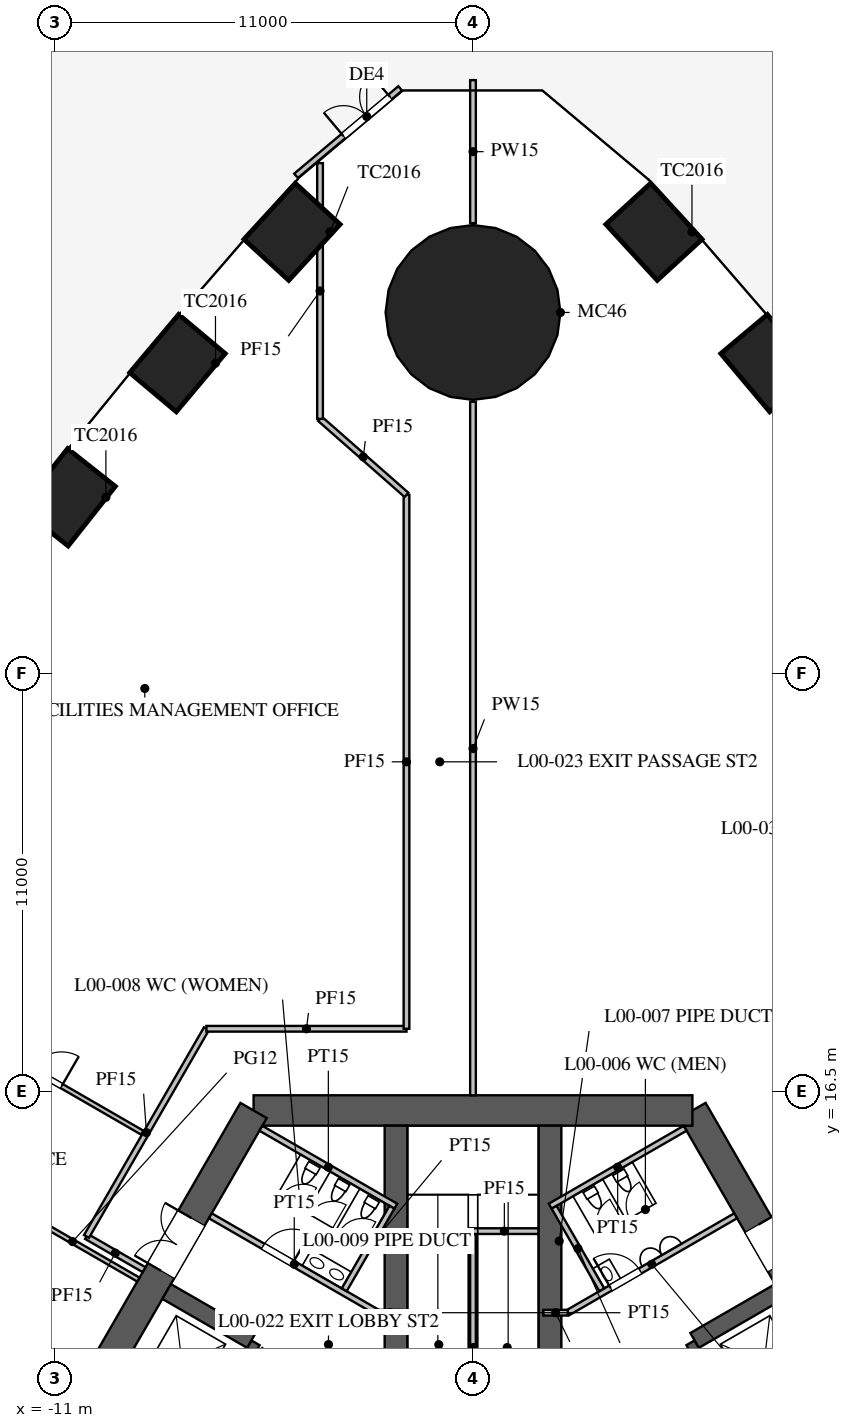
"""IFC4 building model, lengths in metres.
Left out: names, types, materials, properties, quantities, classifications, styles, units other than length and angle.
Written with IfcOpenShell. Run it as: python <this file> out.ifc"""

import sys

from ifc_helpers import new_model, si_unit, direction, frame, frame_2d, origin, origin_2d, place, context, subcontext, project, spatial, polyline, rectangle, circle, outline, extrude, element, fill, save


model = new_model("IFC4")
c1 = context("Model", 3, precision=1e-05, world=origin(), true_north=direction((0.0, 1.0)))
c2 = subcontext(c1, "Body", "Model", "MODEL_VIEW")
j1 = project(units=[si_unit("LENGTHUNIT", "METRE"), si_unit("PLANEANGLEUNIT", "RADIAN")], contexts=[c1])
p1 = place(None, origin())
s1 = spatial("IfcSite", under=j1, at=p1, CompositionType="ELEMENT")
p2 = place(p1, origin())
s2 = spatial("IfcBuilding", under=s1, at=p2, CompositionType="ELEMENT")
p3 = place(p2, origin())
s3 = spatial("IfcBuildingStorey", under=s2, at=p3, CompositionType="ELEMENT", Elevation=0.0)
for number, where, z_axis, x_axis in (
    (1, (7.776, 35.667, 0.0), (0.0, 0.0, 1.0), (-0.643, 0.766, 0.0)),
    (2, (4.762, 39.122, 0.0), (0.0, 0.0, 1.0), (-0.676, 0.737, 0.0)),
    (3, (-4.762, 39.122, 0.0), (0.0, 0.0, 1.0), (-0.676, -0.737, 0.0)),
    (4, (-7.776, 35.667, 0.0), (0.0, 0.0, 1.0), (-0.643, -0.766, 0.0)),
    (5, (-10.66, 32.135, 0.0), (0.0, 0.0, 1.0), (-0.62, -0.784, 0.0)),
):
    element("IfcColumn", number, at=place(p3, frame(where, z_axis=z_axis, x_axis=x_axis)), inside=s3, PredefinedType="COLUMN", context=c2, shape_type="SweptSolid", body=[
        extrude(rectangle(XDim=2.0, YDim=1.6, at=origin_2d()), origin(), (0.0, 0.0, 1.0), 6.5),
    ])
p4 = place(p3, frame((0.0, 37.0, 0.0), z_axis=(0.0, 0.0, 1.0), x_axis=(1.0, 0.0, 0.0)))
e6 = element("IfcColumn", 6, at=p4, inside=s3, PredefinedType="COLUMN", context=c2, shape_type="SweptSolid", body=[
    extrude(circle(Radius=2.3, at=origin_2d()), origin(), (0.0, 0.0, 1.0), 6.5),
])
p5 = place(p3, frame((16.743, -3.0, 0.0), z_axis=(0.0, 0.0, 1.0), x_axis=(-0.500002442456, 0.866023993627, 0.0)))
e7 = element("IfcWall", 7, at=p5, inside=s3, PredefinedType="SHEAR", context=c2, shape_type="SweptSolid", body=[
    extrude(rectangle(XDim=21.939, YDim=0.8, at=frame_2d((10.97, 0.0))), origin(), (0.0, 0.0, 1.0), 6.5),
])
p6 = place(p5, frame((17.27, 0.0, 0.0)))
e8 = element("IfcOpeningElement", 8, at=p6, cuts=e7, PredefinedType="OPENING", context=c2, shape_type="SweptSolid", body=[
    extrude(rectangle(XDim=1.2, YDim=2.1, at=frame_2d((0.6, 1.05))), frame((0.0, 0.41, 0.0), z_axis=(0.0, -1.0, 0.0), x_axis=(1.0, 0.0, 0.0)), (0.0, 0.0, 1.0), 0.82),
])
p7 = place(p5, frame((3.27, 0.0, 0.0)))
e9 = element("IfcOpeningElement", 9, at=p7, cuts=e7, PredefinedType="OPENING", context=c2, shape_type="SweptSolid", body=[
    extrude(rectangle(XDim=1.6, YDim=2.1, at=frame_2d((0.8, 1.05))), frame((0.0, 0.41, 0.0), z_axis=(0.0, -1.0, 0.0), x_axis=(1.0, 0.0, 0.0)), (0.0, 0.0, 1.0), 0.82),
])
p8 = place(p3, frame((5.773, 16.0, 0.0), z_axis=(0.0, 0.0, 1.0), x_axis=(-1.0, 0.0, 0.0)))
e10 = element("IfcWall", 10, at=p8, inside=s3, PredefinedType="SHEAR", context=c2, shape_type="SweptSolid", body=[
    extrude(rectangle(XDim=11.547, YDim=0.8, at=frame_2d((5.773, 0.0))), origin(), (0.0, 0.0, 1.0), 6.5),
])
p9 = place(p3, frame((-5.773, 16.0, 0.0), z_axis=(0.0, 0.0, 1.0), x_axis=(-0.500002442456, -0.866023993627, 0.0)))
e11 = element("IfcWall", 11, at=p9, inside=s3, PredefinedType="SHEAR", context=c2, shape_type="SweptSolid", body=[
    extrude(rectangle(XDim=21.939, YDim=0.8, at=frame_2d((10.97, 0.0))), origin(), (0.0, 0.0, 1.0), 6.5),
])
p10 = place(p9, frame((17.27, 0.0, 0.0)))
e12 = element("IfcOpeningElement", 12, at=p10, cuts=e11, PredefinedType="OPENING", context=c2, shape_type="SweptSolid", body=[
    extrude(rectangle(XDim=1.2, YDim=2.1, at=frame_2d((0.6, 1.05))), frame((0.0, 0.41, 0.0), z_axis=(0.0, -1.0, 0.0), x_axis=(1.0, 0.0, 0.0)), (0.0, 0.0, 1.0), 0.82),
])
p11 = place(p9, frame((3.27, 0.0, 0.0)))
e13 = element("IfcOpeningElement", 13, at=p11, cuts=e11, PredefinedType="OPENING", context=c2, shape_type="SweptSolid", body=[
    extrude(rectangle(XDim=1.6, YDim=2.1, at=frame_2d((0.8, 1.05))), frame((0.0, 0.41, 0.0), z_axis=(0.0, -1.0, 0.0), x_axis=(1.0, 0.0, 0.0)), (0.0, 0.0, 1.0), 0.82),
])
p12 = place(p3, frame((11.424, 0.014, 0.0), z_axis=(0.0, 0.0, 1.0), x_axis=(-0.500001763848, 0.866024385424, 0.0)))
e14 = element("IfcWall", 14, at=p12, inside=s3, PredefinedType="SHEAR", context=c2, shape_type="SweptSolid", body=[
    extrude(rectangle(XDim=11.4, YDim=0.25, at=frame_2d((5.7, 0.0))), origin(), (0.0, 0.0, 1.0), 6.5),
])
p13 = place(p12, frame((0.875, 0.0, 0.0)))
e15 = element("IfcOpeningElement", 15, at=p13, cuts=e14, PredefinedType="OPENING", context=c2, shape_type="SweptSolid", body=[
    extrude(rectangle(XDim=1.1, YDim=2.2, at=frame_2d((0.55, 1.1))), frame((0.0, 0.135, 0.0), z_axis=(0.0, -1.0, 0.0), x_axis=(1.0, 0.0, 0.0)), (0.0, 0.0, 1.0), 0.27),
])
p14 = place(p12, frame((3.725, 0.0, 0.0)))
e16 = element("IfcOpeningElement", 16, at=p14, cuts=e14, PredefinedType="OPENING", context=c2, shape_type="SweptSolid", body=[
    extrude(rectangle(XDim=1.1, YDim=2.2, at=frame_2d((0.55, 1.1))), frame((0.0, 0.135, 0.0), z_axis=(0.0, -1.0, 0.0), x_axis=(1.0, 0.0, 0.0)), (0.0, 0.0, 1.0), 0.27),
])
p15 = place(p12, frame((6.575, 0.0, 0.0)))
e17 = element("IfcOpeningElement", 17, at=p15, cuts=e14, PredefinedType="OPENING", context=c2, shape_type="SweptSolid", body=[
    extrude(rectangle(XDim=1.1, YDim=2.2, at=frame_2d((0.55, 1.1))), frame((0.0, 0.135, 0.0), z_axis=(0.0, -1.0, 0.0), x_axis=(1.0, 0.0, 0.0)), (0.0, 0.0, 1.0), 0.27),
])
p16 = place(p12, frame((9.425, 0.0, 0.0)))
e18 = element("IfcOpeningElement", 18, at=p16, cuts=e14, PredefinedType="OPENING", context=c2, shape_type="SweptSolid", body=[
    extrude(rectangle(XDim=1.1, YDim=2.2, at=frame_2d((0.55, 1.1))), frame((0.0, 0.135, 0.0), z_axis=(0.0, -1.0, 0.0), x_axis=(1.0, 0.0, 0.0)), (0.0, 0.0, 1.0), 0.27),
])
p17 = place(p3, frame((5.832, 9.949, 0.0), z_axis=(0.0, 0.0, 1.0), x_axis=(0.866029291668, 0.499993265928, 0.0)))
e19 = element("IfcWall", 19, at=p17, inside=s3, PredefinedType="SHEAR", context=c2, shape_type="SweptSolid", body=[
    extrude(rectangle(XDim=2.575, YDim=0.45, at=frame_2d((1.288, 0.0))), origin(), (0.0, 0.0, 1.0), 6.5),
])
p18 = place(p3, frame((-5.724, 9.886, 0.0), z_axis=(0.0, 0.0, 1.0), x_axis=(-0.500001763848, -0.866024385424, 0.0)))
e20 = element("IfcWall", 20, at=p18, inside=s3, PredefinedType="SHEAR", context=c2, shape_type="SweptSolid", body=[
    extrude(rectangle(XDim=11.4, YDim=0.25, at=frame_2d((5.7, 0.0))), origin(), (0.0, 0.0, 1.0), 6.5),
])
p19 = place(p18, frame((0.875, 0.0, 0.0)))
e21 = element("IfcOpeningElement", 21, at=p19, cuts=e20, PredefinedType="OPENING", context=c2, shape_type="SweptSolid", body=[
    extrude(rectangle(XDim=1.1, YDim=2.2, at=frame_2d((0.55, 1.1))), frame((0.0, 0.135, 0.0), z_axis=(0.0, -1.0, 0.0), x_axis=(1.0, 0.0, 0.0)), (0.0, 0.0, 1.0), 0.27),
])
p20 = place(p18, frame((3.725, 0.0, 0.0)))
e22 = element("IfcOpeningElement", 22, at=p20, cuts=e20, PredefinedType="OPENING", context=c2, shape_type="SweptSolid", body=[
    extrude(rectangle(XDim=1.1, YDim=2.2, at=frame_2d((0.55, 1.1))), frame((0.0, 0.135, 0.0), z_axis=(0.0, -1.0, 0.0), x_axis=(1.0, 0.0, 0.0)), (0.0, 0.0, 1.0), 0.27),
])
p21 = place(p18, frame((6.525, 0.0, 0.0)))
e23 = element("IfcOpeningElement", 23, at=p21, cuts=e20, PredefinedType="OPENING", context=c2, shape_type="SweptSolid", body=[
    extrude(rectangle(XDim=1.2, YDim=2.2, at=frame_2d((0.6, 1.1))), frame((0.0, 0.135, 0.0), z_axis=(0.0, -1.0, 0.0), x_axis=(1.0, 0.0, 0.0)), (0.0, 0.0, 1.0), 0.27),
])
p22 = place(p18, frame((9.375, 0.0, 0.0)))
e24 = element("IfcOpeningElement", 24, at=p22, cuts=e20, PredefinedType="OPENING", context=c2, shape_type="SweptSolid", body=[
    extrude(rectangle(XDim=1.2, YDim=2.2, at=frame_2d((0.6, 1.1))), frame((0.0, 0.135, 0.0), z_axis=(0.0, -1.0, 0.0), x_axis=(1.0, 0.0, 0.0)), (0.0, 0.0, 1.0), 0.27),
])
p23 = place(p3, frame((-5.832, 9.949, 0.0), z_axis=(0.0, 0.0, 1.0), x_axis=(-0.866029291668, 0.499993265928, 0.0)))
e25 = element("IfcWall", 25, at=p23, inside=s3, PredefinedType="SHEAR", context=c2, shape_type="SweptSolid", body=[
    extrude(rectangle(XDim=2.575, YDim=0.45, at=frame_2d((1.288, 0.0))), origin(), (0.0, 0.0, 1.0), 6.5),
])
p24 = place(p3, frame((2.025, 6.525, 0.0), z_axis=(0.0, 0.0, 1.0), x_axis=(0.0, 1.0, 0.0)))
e26 = element("IfcWall", 26, at=p24, inside=s3, PredefinedType="SHEAR", context=c2, shape_type="SweptSolid", body=[
    extrude(rectangle(XDim=9.075, YDim=0.6, at=frame_2d((4.538, 0.0))), origin(), (0.0, 0.0, 1.0), 6.5),
])
p25 = place(p3, frame((-2.025, 6.525, 0.0), z_axis=(0.0, 0.0, 1.0), x_axis=(0.0, 1.0, 0.0)))
e27 = element("IfcWall", 27, at=p25, inside=s3, PredefinedType="SHEAR", context=c2, shape_type="SweptSolid", body=[
    extrude(rectangle(XDim=9.075, YDim=0.6, at=frame_2d((4.538, 0.0))), origin(), (0.0, 0.0, 1.0), 6.5),
])
p26 = place(p25, frame((0.265, 0.0, 0.0)))
e28 = element("IfcOpeningElement", 28, at=p26, cuts=e27, PredefinedType="OPENING", context=c2, shape_type="SweptSolid", body=[
    extrude(rectangle(XDim=1.6, YDim=2.1, at=frame_2d((0.8, 1.05))), frame((0.0, 0.31, 0.0), z_axis=(0.0, -1.0, 0.0), x_axis=(1.0, 0.0, 0.0)), (0.0, 0.0, 1.0), 0.62),
])
p27 = place(p3, frame((-1.915, 42.896, 0.0), z_axis=(0.0, 0.0, 1.0), x_axis=(-0.766030048501, -0.642804764134, 0.0)))
e29 = element("IfcWall", 29, at=p27, inside=s3, PredefinedType="SOLIDWALL", context=c2, shape_type="SweptSolid", body=[
    extrude(rectangle(XDim=3.578, YDim=0.15, at=frame_2d((1.789, 0.0))), origin(), (0.0, 0.0, 1.0), 6.48),
])
p28 = place(p27, frame((0.35, 0.0, 0.0)))
e30 = element("IfcOpeningElement", 30, at=p28, cuts=e29, PredefinedType="OPENING", context=c2, shape_type="SweptSolid", body=[
    extrude(rectangle(XDim=1.6, YDim=2.4, at=frame_2d((0.8, 1.2))), frame((0.0, 0.085, 0.0), z_axis=(0.0, -1.0, 0.0), x_axis=(1.0, 0.0, 0.0)), (0.0, 0.0, 1.0), 0.17),
])
p29 = place(p3, frame((2.495, 10.678, 0.0), z_axis=(0.0, 0.0, 1.0), x_axis=(0.86602216432, 0.500005610874, 0.0)))
e31 = element("IfcWall", 31, at=p29, inside=s3, PredefinedType="PARTITIONING", context=c2, shape_type="SweptSolid", body=[
    extrude(rectangle(XDim=5.1, YDim=0.15, at=frame_2d((2.55, 0.0))), origin(), (0.0, 0.0, 1.0), 6.3),
])
p30 = place(p29, frame((1.3, 0.0, 0.0)))
e32 = element("IfcOpeningElement", 32, at=p30, cuts=e31, PredefinedType="OPENING", context=c2, shape_type="SweptSolid", body=[
    extrude(rectangle(XDim=0.9, YDim=2.1, at=frame_2d((0.45, 1.05))), frame((0.0, 0.085, 0.0), z_axis=(0.0, -1.0, 0.0), x_axis=(1.0, 0.0, 0.0)), (0.0, 0.0, 1.0), 0.17),
])
p31 = place(p3, frame((-2.495, 10.678, 0.0), z_axis=(0.0, 0.0, 1.0), x_axis=(-0.86602216432, 0.500005610874, 0.0)))
e33 = element("IfcWall", 33, at=p31, inside=s3, PredefinedType="PARTITIONING", context=c2, shape_type="SweptSolid", body=[
    extrude(rectangle(XDim=5.1, YDim=0.15, at=frame_2d((2.55, 0.0))), origin(), (0.0, 0.0, 1.0), 6.3),
])
p32 = place(p31, frame((2.6, 0.0, 0.0)))
e34 = element("IfcOpeningElement", 34, at=p32, cuts=e33, PredefinedType="OPENING", context=c2, shape_type="SweptSolid", body=[
    extrude(rectangle(XDim=0.9, YDim=2.1, at=frame_2d((0.45, 1.05))), frame((0.0, 0.085, 0.0), z_axis=(0.0, -1.0, 0.0), x_axis=(1.0, 0.0, 0.0)), (0.0, 0.0, 1.0), 0.17),
])
for number, where, z_axis, x_axis in (
    (35, (2.495, 10.678, 0.0), (0.0, 0.0, 1.0), (-1.0, 0.0, 0.0)),
    (36, (-2.495, 10.678, 0.0), (0.0, 0.0, 1.0), (1.0, 0.0, 0.0)),
):
    element("IfcWall", number, at=place(p3, frame(where, z_axis=z_axis, x_axis=x_axis)), inside=s3, PredefinedType="PARTITIONING", context=c2, shape_type="SweptSolid", body=[
        extrude(rectangle(XDim=0.645, YDim=0.15, at=frame_2d((0.323, 0.0))), origin(), (0.0, 0.0, 1.0), 6.3),
    ])
p33 = place(p3, frame((2.031, 13.482, 0.0), z_axis=(0.0, 0.0, 1.0), x_axis=(0.866050731258, 0.499956128963, 0.0)))
e37 = element("IfcWall", 37, at=p33, inside=s3, PredefinedType="PARTITIONING", context=c2, shape_type="SweptSolid", body=[
    extrude(rectangle(XDim=4.1, YDim=0.15, at=frame_2d((2.05, 0.0))), origin(), (0.0, 0.0, 1.0), 6.3),
])
p34 = place(p3, frame((3.389, 11.281, 0.0), z_axis=(0.0, 0.0, 1.0), x_axis=(-0.499989096993, 0.866031698547, 0.0)))
e38 = element("IfcWall", 38, at=p34, inside=s3, PredefinedType="PARTITIONING", context=c2, shape_type="SweptSolid", body=[
    extrude(rectangle(XDim=2.51, YDim=0.15, at=frame_2d((1.255, 0.0))), origin(), (0.0, 0.0, 1.0), 6.3),
])
p35 = place(p3, frame((-2.031, 13.482, 0.0), z_axis=(0.0, 0.0, 1.0), x_axis=(-0.866050731258, 0.499956128963, 0.0)))
e39 = element("IfcWall", 39, at=p35, inside=s3, PredefinedType="PARTITIONING", context=c2, shape_type="SweptSolid", body=[
    extrude(rectangle(XDim=4.1, YDim=0.15, at=frame_2d((2.05, 0.0))), origin(), (0.0, 0.0, 1.0), 6.3),
])
p36 = place(p3, frame((-3.389, 11.281, 0.0), z_axis=(0.0, 0.0, 1.0), x_axis=(0.499989096993, 0.866031698547, 0.0)))
e40 = element("IfcWall", 40, at=p36, inside=s3, PredefinedType="PARTITIONING", context=c2, shape_type="SweptSolid", body=[
    extrude(rectangle(XDim=2.51, YDim=0.15, at=frame_2d((1.255, 0.0))), origin(), (0.0, 0.0, 1.0), 6.3),
])
p37 = place(p3, frame((0.0, 16.4, 0.0), z_axis=(0.0, 0.0, 1.0), x_axis=(0.0, 1.0, 0.0)))
e41 = element("IfcWall", 41, at=p37, inside=s3, PredefinedType="PARTITIONING", context=c2, shape_type="SweptSolid", body=[
    extrude(rectangle(XDim=18.25, YDim=0.15, at=frame_2d((9.125, 0.0))), origin(), (0.0, 0.0, 1.0), 4.6),
])
p38 = place(p3, frame((0.0, 39.35, 0.0), z_axis=(0.0, 0.0, 1.0), x_axis=(0.0, 1.0, 0.0)))
e42 = element("IfcWall", 42, at=p38, inside=s3, PredefinedType="PARTITIONING", context=c2, shape_type="SweptSolid", body=[
    extrude(rectangle(XDim=3.764, YDim=0.15, at=frame_2d((1.882, 0.0))), origin(), (0.0, 0.0, 1.0), 4.6),
])
p39 = place(p3, frame((-8.805, 11.55, 0.0), z_axis=(0.0, 0.0, 1.0), x_axis=(-0.866026010844, 0.49999894854, 0.0)))
e43 = element("IfcWall", 43, at=p39, inside=s3, PredefinedType="PARTITIONING", context=c2, shape_type="SweptSolid", body=[
    extrude(rectangle(XDim=4.0, YDim=0.12, at=frame_2d((2.0, 0.0))), origin(), (0.0, 0.0, 1.0), 5.0),
])
p40 = place(p3, frame((-8.703, 15.417, 0.0), z_axis=(0.0, 0.0, 1.0), x_axis=(-0.866031156864, 0.499990035242, 0.0)))
e44 = element("IfcWall", 44, at=p40, inside=s3, PredefinedType="PARTITIONING", context=c2, shape_type="SweptSolid", body=[
    extrude(rectangle(XDim=10.61, YDim=0.12, at=frame_2d((5.305, 0.0))), origin(), (0.0, 0.0, 1.0), 5.0),
])
p41 = place(p40, frame((2.45, 0.0, 0.0)))
e45 = element("IfcOpeningElement", 45, at=p41, cuts=e44, PredefinedType="OPENING", context=c2, shape_type="SweptSolid", body=[
    extrude(rectangle(XDim=0.9, YDim=2.1, at=frame_2d((0.45, 1.05))), frame((0.0, 0.07, 0.0), z_axis=(0.0, -1.0, 0.0), x_axis=(1.0, 0.0, 0.0)), (0.0, 0.0, 1.0), 0.14),
])
p42 = place(p3, frame((0.0, 6.775, 0.0), z_axis=(0.0, 0.0, 1.0), x_axis=(0.0, 1.0, 0.0)))
e46 = element("IfcWall", 46, at=p42, inside=s3, PredefinedType="PARTITIONING", context=c2, shape_type="SweptSolid", body=[
    extrude(outline(polyline([(0.0, 0.0), (5.975, 0.0), (5.975, 4.014), (1.966, 6.3), (0.0, 6.3), (0.0, 0.0)])), frame((0.0, 0.075, 0.0), z_axis=(0.0, -1.0, 0.0), x_axis=(1.0, 0.0, 0.0)), (0.0, 0.0, 1.0), 0.15),
])
p43 = place(p3, frame((1.725, 12.825, 0.0), z_axis=(0.0, 0.0, 1.0), x_axis=(-1.0, 0.0, 0.0)))
e47 = element("IfcWall", 47, at=p43, inside=s3, PredefinedType="PARTITIONING", context=c2, shape_type="SweptSolid", body=[
    extrude(rectangle(XDim=1.8, YDim=0.15, at=frame_2d((0.9, 0.0))), origin(), (0.0, 0.0, 1.0), 3.575),
])
p44 = place(p3, frame((-4.552, 8.517, 0.0), z_axis=(0.0, 0.0, 1.0), x_axis=(-0.663443129067, 0.748226713299, 0.0)))
e48 = element("IfcWall", 48, at=p44, inside=s3, PredefinedType="PARTITIONING", context=c2, shape_type="SweptSolid", body=[
    extrude(rectangle(XDim=1.581, YDim=0.15, at=frame_2d((0.791, 0.0))), origin(), (0.0, 0.0, 1.0), 6.3),
])
p45 = place(p3, frame((-8.655, 11.81, 0.0), z_axis=(0.0, 0.0, 1.0), x_axis=(-0.866002029911, 0.500040482552, 0.0)))
e49 = element("IfcWall", 49, at=p45, inside=s3, PredefinedType="PARTITIONING", context=c2, shape_type="SweptSolid", body=[
    extrude(rectangle(XDim=1.75, YDim=0.15, at=frame_2d((0.875, 0.0))), origin(), (0.0, 0.0, 1.0), 6.3),
])
p46 = place(p3, frame((-10.17, 12.685, 0.0), z_axis=(0.0, 0.0, 1.0), x_axis=(0.4999836609, 0.866034836963, 0.0)))
e50 = element("IfcWall", 50, at=p46, inside=s3, PredefinedType="PARTITIONING", context=c2, shape_type="SweptSolid", body=[
    extrude(rectangle(XDim=6.311, YDim=0.15, at=frame_2d((3.155, 0.0))), origin(), (0.0, 0.0, 1.0), 6.3),
])
p47 = place(p3, frame((-7.015, 18.15, 0.0), z_axis=(0.0, 0.0, 1.0), x_axis=(1.0, 0.0, 0.0)))
e51 = element("IfcWall", 51, at=p47, inside=s3, PredefinedType="PARTITIONING", context=c2, shape_type="SweptSolid", body=[
    extrude(rectangle(XDim=5.265, YDim=0.15, at=frame_2d((2.632, 0.0))), origin(), (0.0, 0.0, 1.0), 6.3),
])
p48 = place(p3, frame((-1.75, 18.15, 0.0), z_axis=(0.0, 0.0, 1.0), x_axis=(0.0, 1.0, 0.0)))
e52 = element("IfcWall", 52, at=p48, inside=s3, PredefinedType="PARTITIONING", context=c2, shape_type="SweptSolid", body=[
    extrude(rectangle(XDim=14.05, YDim=0.15, at=frame_2d((7.025, 0.0))), origin(), (0.0, 0.0, 1.0), 6.3),
])
p49 = place(p3, frame((-1.75, 32.2, 0.0), z_axis=(0.0, 0.0, 1.0), x_axis=(-0.751026818711, 0.660271699815, 0.0)))
e53 = element("IfcWall", 53, at=p49, inside=s3, PredefinedType="PARTITIONING", context=c2, shape_type="SweptSolid", body=[
    extrude(rectangle(XDim=3.029, YDim=0.15, at=frame_2d((1.515, 0.0))), origin(), (0.0, 0.0, 1.0), 5.7),
])
p50 = place(p3, frame((-4.025, 34.2, 0.0), z_axis=(0.0, 0.0, 1.0), x_axis=(0.0, 1.0, 0.0)))
e54 = element("IfcWall", 54, at=p50, inside=s3, PredefinedType="PARTITIONING", context=c2, shape_type="SweptSolid", body=[
    extrude(rectangle(XDim=6.73, YDim=0.15, at=frame_2d((3.365, 0.0))), origin(), (0.0, 0.0, 1.0), 6.3),
])
p51 = place(p28, frame((1.6, 0.0, 0.0), z_axis=(0.0, 0.0, 1.0), x_axis=(-1.0, 0.0, 0.0)))
e55 = element("IfcDoor", 55, at=p51, inside=s3, OperationType="DOUBLE_DOOR_SINGLE_SWING", PredefinedType="DOOR", context=c2, shape_type="SweptSolid", body=[
    extrude(rectangle(XDim=1.6, YDim=2.4, at=frame_2d((0.8, 1.2))), frame((0.0, 0.025, 0.0), z_axis=(0.0, -1.0, 0.0), x_axis=(1.0, 0.0, 0.0)), (0.0, 0.0, 1.0), 0.05),
])
fill(e30, e55)
p52 = place(p30, origin())
e56 = element("IfcDoor", 56, at=p52, inside=s3, OperationType="SINGLE_SWING_LEFT", PredefinedType="DOOR", context=c2, shape_type="SweptSolid", body=[
    extrude(rectangle(XDim=0.9, YDim=2.1, at=frame_2d((0.45, 1.05))), frame((0.0, 0.025, 0.0), z_axis=(0.0, -1.0, 0.0), x_axis=(1.0, 0.0, 0.0)), (0.0, 0.0, 1.0), 0.05),
])
fill(e32, e56)
p53 = place(p32, frame((0.9, 0.0, 0.0), z_axis=(0.0, 0.0, 1.0), x_axis=(-1.0, 0.0, 0.0)))
e57 = element("IfcDoor", 57, at=p53, inside=s3, OperationType="SINGLE_SWING_RIGHT", PredefinedType="DOOR", context=c2, shape_type="SweptSolid", body=[
    extrude(rectangle(XDim=0.9, YDim=2.1, at=frame_2d((0.45, 1.05))), frame((0.0, 0.025, 0.0), z_axis=(0.0, -1.0, 0.0), x_axis=(1.0, 0.0, 0.0)), (0.0, 0.0, 1.0), 0.05),
])
fill(e34, e57)
p54 = place(p6, frame((1.2, 0.0, 0.0), z_axis=(0.0, 0.0, 1.0), x_axis=(-1.0, 0.0, 0.0)))
e58 = element("IfcDoor", 58, at=p54, inside=s3, OperationType="SINGLE_SWING_LEFT", PredefinedType="DOOR", context=c2, shape_type="SweptSolid", body=[
    extrude(rectangle(XDim=1.2, YDim=2.1, at=frame_2d((0.6, 1.05))), frame((0.0, 0.025, 0.0), z_axis=(0.0, -1.0, 0.0), x_axis=(1.0, 0.0, 0.0)), (0.0, 0.0, 1.0), 0.05),
])
fill(e8, e58)
p55 = place(p11, frame((1.6, 0.0, 0.0), z_axis=(0.0, 0.0, 1.0), x_axis=(-1.0, 0.0, 0.0)))
e59 = element("IfcDoor", 59, at=p55, inside=s3, OperationType="DOUBLE_DOOR_SINGLE_SWING", PredefinedType="DOOR", context=c2, shape_type="SweptSolid", body=[
    extrude(rectangle(XDim=1.6, YDim=2.1, at=frame_2d((0.8, 1.05))), frame((0.0, 0.025, 0.0), z_axis=(0.0, -1.0, 0.0), x_axis=(1.0, 0.0, 0.0)), (0.0, 0.0, 1.0), 0.05),
])
fill(e13, e59)
p56 = place(p41, frame((0.9, 0.0, 0.0), z_axis=(0.0, 0.0, 1.0), x_axis=(-1.0, 0.0, 0.0)))
e60 = element("IfcDoor", 60, at=p56, inside=s3, OperationType="SINGLE_SWING_RIGHT", PredefinedType="DOOR", context=c2, shape_type="SweptSolid", body=[
    extrude(rectangle(XDim=0.9, YDim=2.1, at=frame_2d((0.45, 1.05))), frame((0.0, 0.025, 0.0), z_axis=(0.0, -1.0, 0.0), x_axis=(1.0, 0.0, 0.0)), (0.0, 0.0, 1.0), 0.05),
])
fill(e45, e60)
save(model, sys.argv[1])
